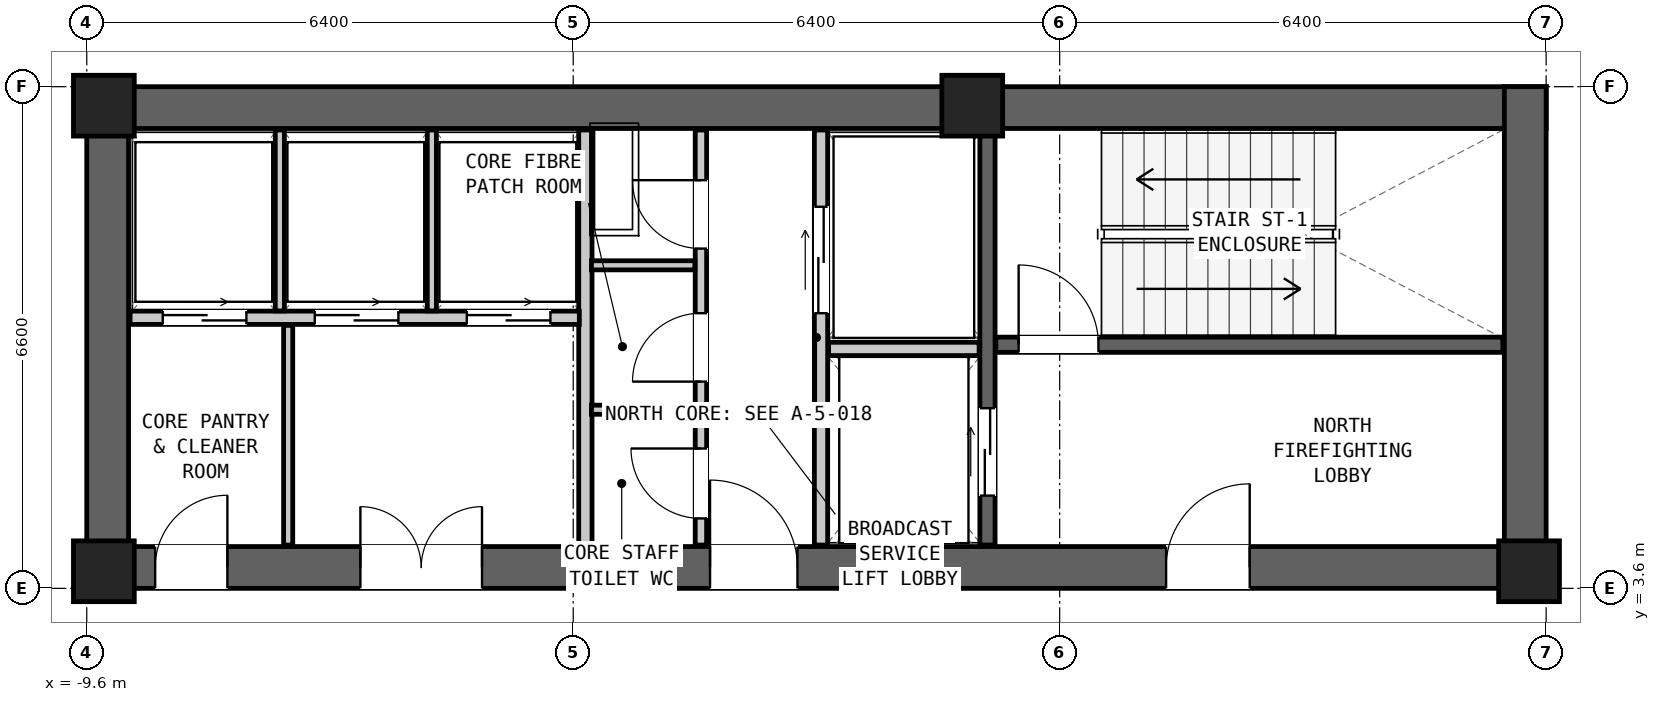
"""IFC4 building model, lengths in metres.
Left out: names, types, materials, properties, quantities, classifications, styles, units other than length and angle.
Written with IfcOpenShell. Run it as: python <this file> out.ifc"""

import sys

from ifc_helpers import new_model, si_unit, direction, frame, frame_2d, origin, origin_2d, place, context, subcontext, project, spatial, rectangle, extrude, element, fill, save


model = new_model("IFC4")
c1 = context("Model", 3, precision=1e-05, world=origin(), true_north=direction((0.0, 1.0)))
c2 = subcontext(c1, "Body", "Model", "MODEL_VIEW")
j1 = project(units=[si_unit("LENGTHUNIT", "METRE"), si_unit("PLANEANGLEUNIT", "RADIAN")], contexts=[c1])
p1 = place(None, origin())
s1 = spatial("IfcSite", under=j1, at=p1, CompositionType="ELEMENT")
p2 = place(p1, origin())
s2 = spatial("IfcBuilding", under=s1, at=p2, CompositionType="ELEMENT")
p3 = place(p2, frame((0.0, 0.0, 53.55)))
s3 = spatial("IfcBuildingStorey", under=s2, at=p3, CompositionType="ELEMENT", Elevation=53.55)
p4 = place(p3, frame((-9.6, 9.925, 0.0), z_axis=(0.0, 0.0, 1.0), x_axis=(1.0, 0.0, 0.0)))
e1 = element("IfcWall", 1, at=p4, inside=s3, PredefinedType="SHEAR", context=c2, shape_type="SweptSolid", body=[
    extrude(rectangle(XDim=19.2, YDim=0.55, at=frame_2d((9.6, 0.0))), origin(), (0.0, 0.0, 1.0), 4.35),
])
p5 = place(p3, frame((-9.6, 3.875, 0.0), z_axis=(0.0, 0.0, 1.0), x_axis=(1.0, 0.0, 0.0)))
e2 = element("IfcWall", 2, at=p5, inside=s3, PredefinedType="SHEAR", context=c2, shape_type="SweptSolid", body=[
    extrude(rectangle(XDim=19.2, YDim=0.55, at=frame_2d((9.6, 0.0))), origin(), (0.0, 0.0, 1.0), 4.35),
])
p6 = place(p5, frame((14.2, 0.0, 0.0)))
e3 = element("IfcOpeningElement", 3, at=p6, cuts=e2, PredefinedType="OPENING", context=c2, shape_type="SweptSolid", body=[
    extrude(rectangle(XDim=1.1, YDim=2.08, at=frame_2d((0.55, 1.04))), frame((0.0, 0.287, 0.0), z_axis=(0.0, -1.0, 0.0), x_axis=(1.0, 0.0, 0.0)), (0.0, 0.0, 1.0), 0.574),
])
p7 = place(p5, frame((8.2, 0.0, 0.0)))
e4 = element("IfcOpeningElement", 4, at=p7, cuts=e2, PredefinedType="OPENING", context=c2, shape_type="SweptSolid", body=[
    extrude(rectangle(XDim=1.15, YDim=2.1, at=frame_2d((0.575, 1.05))), frame((0.0, 0.287, 0.0), z_axis=(0.0, -1.0, 0.0), x_axis=(1.0, 0.0, 0.0)), (0.0, 0.0, 1.0), 0.574),
])
p8 = place(p5, frame((0.9, 0.0, 0.0)))
e5 = element("IfcOpeningElement", 5, at=p8, cuts=e2, PredefinedType="OPENING", context=c2, shape_type="SweptSolid", body=[
    extrude(rectangle(XDim=0.95, YDim=2.1, at=frame_2d((0.475, 1.05))), frame((0.0, 0.287, 0.0), z_axis=(0.0, -1.0, 0.0), x_axis=(1.0, 0.0, 0.0)), (0.0, 0.0, 1.0), 0.574),
])
p9 = place(p5, frame((3.6, 0.0, 0.0)))
e6 = element("IfcOpeningElement", 6, at=p9, cuts=e2, PredefinedType="OPENING", context=c2, shape_type="SweptSolid", body=[
    extrude(rectangle(XDim=1.6, YDim=2.12, at=frame_2d((0.8, 1.06))), frame((0.0, 0.287, 0.0), z_axis=(0.0, -1.0, 0.0), x_axis=(1.0, 0.0, 0.0)), (0.0, 0.0, 1.0), 0.574),
])
for number, where, z_axis, x_axis in (
    (7, (-9.325, 3.6, 0.0), (0.0, 0.0, 1.0), (0.0, 1.0, 0.0)),
    (8, (9.325, 3.6, 0.0), (0.0, 0.0, 1.0), (0.0, 1.0, 0.0)),
):
    element("IfcWall", number, at=place(p3, frame(where, z_axis=z_axis, x_axis=x_axis)), inside=s3, PredefinedType="SHEAR", context=c2, shape_type="SweptSolid", body=[
        extrude(rectangle(XDim=6.6, YDim=0.55, at=frame_2d((3.3, 0.0))), origin(), (0.0, 0.0, 1.0), 4.35),
    ])
for number, where, z_axis, x_axis in (
    (9, (-9.375, 9.95, 0.0), (0.0, 0.0, 1.0), (1.0, 0.0, 0.0)),
    (10, (2.05, 9.95, 0.0), (0.0, 0.0, 1.0), (1.0, 0.0, 0.0)),
    (11, (-9.375, 3.825, 0.0), (0.0, 0.0, 1.0), (1.0, 0.0, 0.0)),
    (12, (9.375, 3.825, 0.0), (0.0, 0.0, 1.0), (1.0, 0.0, 0.0)),
):
    element("IfcColumn", number, at=place(p3, frame(where, z_axis=z_axis, x_axis=x_axis)), inside=s3, PredefinedType="COLUMN", context=c2, shape_type="SweptSolid", body=[
        extrude(rectangle(XDim=0.8, YDim=0.8, at=origin_2d()), origin(), (0.0, 0.0, 1.0), 4.35),
    ])
p10 = place(p3, frame((2.36, 6.805, 0.0), z_axis=(0.0, 0.0, 1.0), x_axis=(1.0, 0.0, 0.0)))
e13 = element("IfcWall", 13, at=p10, inside=s3, PredefinedType="SHEAR", context=c2, shape_type="SweptSolid", body=[
    extrude(rectangle(XDim=6.67, YDim=0.2, at=frame_2d((3.335, 0.0))), origin(), (0.0, 0.0, 1.0), 4.07),
])
p11 = place(p10, frame((0.3, 0.0, 0.0)))
e14 = element("IfcOpeningElement", 14, at=p11, cuts=e13, PredefinedType="OPENING", context=c2, shape_type="SweptSolid", body=[
    extrude(rectangle(XDim=1.05, YDim=2.08, at=frame_2d((0.525, 1.04))), frame((0.0, 0.112, 0.0), z_axis=(0.0, -1.0, 0.0), x_axis=(1.0, 0.0, 0.0)), (0.0, 0.0, 1.0), 0.224),
])
p12 = place(p3, frame((2.25, 4.17, 0.0), z_axis=(0.0, 0.0, 1.0), x_axis=(0.0, 1.0, 0.0)))
e15 = element("IfcWall", 15, at=p12, inside=s3, PredefinedType="SHEAR", context=c2, shape_type="SweptSolid", body=[
    extrude(rectangle(XDim=5.46, YDim=0.2, at=frame_2d((2.73, 0.0))), origin(), (0.0, 0.0, 1.0), 4.07),
])
p13 = place(p12, frame((0.65, 0.0, 0.0)))
e16 = element("IfcOpeningElement", 16, at=p13, cuts=e15, PredefinedType="OPENING", context=c2, shape_type="SweptSolid", body=[
    extrude(rectangle(XDim=1.15, YDim=2.08, at=frame_2d((0.575, 1.04))), frame((0.0, 0.112, 0.0), z_axis=(0.0, -1.0, 0.0), x_axis=(1.0, 0.0, 0.0)), (0.0, 0.0, 1.0), 0.224),
])
p14 = place(p3, frame((0.06, 4.17, 0.0), z_axis=(0.0, 0.0, 1.0), x_axis=(0.0, 1.0, 0.0)))
e17 = element("IfcWall", 17, at=p14, inside=s3, PredefinedType="PARTITIONING", context=c2, shape_type="SweptSolid", body=[
    extrude(rectangle(XDim=5.46, YDim=0.175, at=frame_2d((2.73, 0.0))), origin(), (0.0, 0.0, 1.0), 4.07),
])
p15 = place(p14, frame((3.05, 0.0, 0.0)))
e18 = element("IfcOpeningElement", 18, at=p15, cuts=e17, PredefinedType="OPENING", context=c2, shape_type="SweptSolid", body=[
    extrude(rectangle(XDim=1.4, YDim=2.12, at=frame_2d((0.7, 1.06))), frame((0.0, 0.1, 0.0), z_axis=(0.0, -1.0, 0.0), x_axis=(1.0, 0.0, 0.0)), (0.0, 0.0, 1.0), 0.199),
])
p16 = place(p3, frame((0.16, 6.75, 0.0), z_axis=(0.0, 0.0, 1.0), x_axis=(1.0, 0.0, 0.0)))
e19 = element("IfcWall", 19, at=p16, inside=s3, PredefinedType="PARTITIONING", context=c2, shape_type="SweptSolid", body=[
    extrude(rectangle(XDim=1.98, YDim=0.175, at=frame_2d((0.99, 0.0))), origin(), (0.0, 0.0, 1.0), 4.07),
])
p17 = place(p3, frame((-3.04, 4.17, 0.0), z_axis=(0.0, 0.0, 1.0), x_axis=(0.0, 1.0, 0.0)))
e20 = element("IfcWall", 20, at=p17, inside=s3, PredefinedType="PARTITIONING", context=c2, shape_type="SweptSolid", body=[
    extrude(rectangle(XDim=5.46, YDim=0.175, at=frame_2d((2.73, 0.0))), origin(), (0.0, 0.0, 1.0), 4.07),
])
p18 = place(p3, frame((-1.52, 4.17, 0.0), z_axis=(0.0, 0.0, 1.0), x_axis=(0.0, 1.0, 0.0)))
e21 = element("IfcWall", 21, at=p18, inside=s3, PredefinedType="PARTITIONING", context=c2, shape_type="SweptSolid", body=[
    extrude(rectangle(XDim=5.46, YDim=0.15, at=frame_2d((2.73, 0.0))), origin(), (0.0, 0.0, 1.0), 4.07),
])
p19 = place(p18, frame((3.9, 0.0, 0.0)))
e22 = element("IfcOpeningElement", 22, at=p19, cuts=e21, PredefinedType="OPENING", context=c2, shape_type="SweptSolid", body=[
    extrude(rectangle(XDim=0.9, YDim=2.05, at=frame_2d((0.45, 1.025))), frame((0.0, 0.087, 0.0), z_axis=(0.0, -1.0, 0.0), x_axis=(1.0, 0.0, 0.0)), (0.0, 0.0, 1.0), 0.174),
])
p20 = place(p18, frame((2.15, 0.0, 0.0)))
e23 = element("IfcOpeningElement", 23, at=p20, cuts=e21, PredefinedType="OPENING", context=c2, shape_type="SweptSolid", body=[
    extrude(rectangle(XDim=0.9, YDim=2.05, at=frame_2d((0.45, 1.025))), frame((0.0, 0.087, 0.0), z_axis=(0.0, -1.0, 0.0), x_axis=(1.0, 0.0, 0.0)), (0.0, 0.0, 1.0), 0.174),
])
p21 = place(p18, frame((0.35, 0.0, 0.0)))
e24 = element("IfcOpeningElement", 24, at=p21, cuts=e21, PredefinedType="OPENING", context=c2, shape_type="SweptSolid", body=[
    extrude(rectangle(XDim=0.92, YDim=2.1, at=frame_2d((0.46, 1.05))), frame((0.0, 0.087, 0.0), z_axis=(0.0, -1.0, 0.0), x_axis=(1.0, 0.0, 0.0)), (0.0, 0.0, 1.0), 0.174),
])
for number, where, z_axis, x_axis in (
    (25, (-2.96, 5.95, 0.0), (0.0, 0.0, 1.0), (1.0, 0.0, 0.0)),
    (26, (-2.96, 7.85, 0.0), (0.0, 0.0, 1.0), (1.0, 0.0, 0.0)),
):
    element("IfcWall", number, at=place(p3, frame(where, z_axis=z_axis, x_axis=x_axis)), inside=s3, PredefinedType="PARTITIONING", context=c2, shape_type="SweptSolid", body=[
        extrude(rectangle(XDim=1.36, YDim=0.12, at=frame_2d((0.68, 0.0))), origin(), (0.0, 0.0, 1.0), 4.07),
    ])
p22 = place(p3, frame((-9.03, 7.16, 0.0), z_axis=(0.0, 0.0, 1.0), x_axis=(1.0, 0.0, 0.0)))
e27 = element("IfcWall", 27, at=p22, inside=s3, PredefinedType="PARTITIONING", context=c2, shape_type="SweptSolid", body=[
    extrude(rectangle(XDim=5.91, YDim=0.175, at=frame_2d((2.955, 0.0))), origin(), (0.0, 0.0, 1.0), 4.07),
])
p23 = place(p22, frame((0.43, 0.0, 0.0)))
e28 = element("IfcOpeningElement", 28, at=p23, cuts=e27, PredefinedType="OPENING", context=c2, shape_type="SweptSolid", body=[
    extrude(rectangle(XDim=1.1, YDim=2.06, at=frame_2d((0.55, 1.03))), frame((0.0, 0.1, 0.0), z_axis=(0.0, -1.0, 0.0), x_axis=(1.0, 0.0, 0.0)), (0.0, 0.0, 1.0), 0.199),
])
p24 = place(p22, frame((2.43, 0.0, 0.0)))
e29 = element("IfcOpeningElement", 29, at=p24, cuts=e27, PredefinedType="OPENING", context=c2, shape_type="SweptSolid", body=[
    extrude(rectangle(XDim=1.1, YDim=2.06, at=frame_2d((0.55, 1.03))), frame((0.0, 0.1, 0.0), z_axis=(0.0, -1.0, 0.0), x_axis=(1.0, 0.0, 0.0)), (0.0, 0.0, 1.0), 0.199),
])
p25 = place(p22, frame((4.43, 0.0, 0.0)))
e30 = element("IfcOpeningElement", 30, at=p25, cuts=e27, PredefinedType="OPENING", context=c2, shape_type="SweptSolid", body=[
    extrude(rectangle(XDim=1.1, YDim=2.06, at=frame_2d((0.55, 1.03))), frame((0.0, 0.1, 0.0), z_axis=(0.0, -1.0, 0.0), x_axis=(1.0, 0.0, 0.0)), (0.0, 0.0, 1.0), 0.199),
])
for number, where, z_axis, x_axis in (
    (31, (-7.06, 7.25, 0.0), (0.0, 0.0, 1.0), (0.0, 1.0, 0.0)),
    (32, (-5.06, 7.25, 0.0), (0.0, 0.0, 1.0), (0.0, 1.0, 0.0)),
):
    element("IfcWall", number, at=place(p3, frame(where, z_axis=z_axis, x_axis=x_axis)), inside=s3, PredefinedType="PARTITIONING", context=c2, shape_type="SweptSolid", body=[
        extrude(rectangle(XDim=2.38, YDim=0.12, at=frame_2d((1.19, 0.0))), origin(), (0.0, 0.0, 1.0), 4.07),
    ])
p26 = place(p3, frame((-6.95, 4.17, 0.0), z_axis=(0.0, 0.0, 1.0), x_axis=(0.0, 1.0, 0.0)))
e33 = element("IfcWall", 33, at=p26, inside=s3, PredefinedType="PARTITIONING", context=c2, shape_type="SweptSolid", body=[
    extrude(rectangle(XDim=2.89, YDim=0.12, at=frame_2d((1.445, 0.0))), origin(), (0.0, 0.0, 1.0), 4.07),
])
p27 = place(p11, origin())
e34 = element("IfcDoor", 34, at=p27, inside=s3, OperationType="SINGLE_SWING_LEFT", PredefinedType="DOOR", context=c2, shape_type="SweptSolid", body=[
    extrude(rectangle(XDim=1.05, YDim=2.08, at=frame_2d((0.525, 1.04))), frame((0.0, 0.025, 0.0), z_axis=(0.0, -1.0, 0.0), x_axis=(1.0, 0.0, 0.0)), (0.0, 0.0, 1.0), 0.05),
])
fill(e14, e34)
p28 = place(p6, origin())
e35 = element("IfcDoor", 35, at=p28, inside=s3, OperationType="SINGLE_SWING_RIGHT", PredefinedType="DOOR", context=c2, shape_type="SweptSolid", body=[
    extrude(rectangle(XDim=1.1, YDim=2.08, at=frame_2d((0.55, 1.04))), frame((0.0, 0.025, 0.0), z_axis=(0.0, -1.0, 0.0), x_axis=(1.0, 0.0, 0.0)), (0.0, 0.0, 1.0), 0.05),
])
fill(e3, e35)
p29 = place(p13, origin())
e36 = element("IfcDoor", 36, at=p29, inside=s3, OperationType="DOUBLE_DOOR_SLIDING", PredefinedType="DOOR", context=c2, shape_type="SweptSolid", body=[
    extrude(rectangle(XDim=1.15, YDim=2.08, at=frame_2d((0.575, 1.04))), frame((0.0, 0.025, 0.0), z_axis=(0.0, -1.0, 0.0), x_axis=(1.0, 0.0, 0.0)), (0.0, 0.0, 1.0), 0.05),
])
fill(e16, e36)
p30 = place(p15, origin())
e37 = element("IfcDoor", 37, at=p30, inside=s3, OperationType="DOUBLE_DOOR_SLIDING", PredefinedType="DOOR", context=c2, shape_type="SweptSolid", body=[
    extrude(rectangle(XDim=1.4, YDim=2.12, at=frame_2d((0.7, 1.06))), frame((0.0, 0.025, 0.0), z_axis=(0.0, -1.0, 0.0), x_axis=(1.0, 0.0, 0.0)), (0.0, 0.0, 1.0), 0.05),
])
fill(e18, e37)
p31 = place(p7, origin())
e38 = element("IfcDoor", 38, at=p31, inside=s3, OperationType="SINGLE_SWING_LEFT", PredefinedType="DOOR", context=c2, shape_type="SweptSolid", body=[
    extrude(rectangle(XDim=1.15, YDim=2.1, at=frame_2d((0.575, 1.05))), frame((0.0, 0.025, 0.0), z_axis=(0.0, -1.0, 0.0), x_axis=(1.0, 0.0, 0.0)), (0.0, 0.0, 1.0), 0.05),
])
fill(e4, e38)
p32 = place(p19, origin())
e39 = element("IfcDoor", 39, at=p32, inside=s3, OperationType="SINGLE_SWING_RIGHT", PredefinedType="DOOR", context=c2, shape_type="SweptSolid", body=[
    extrude(rectangle(XDim=0.9, YDim=2.05, at=frame_2d((0.45, 1.025))), frame((0.0, 0.025, 0.0), z_axis=(0.0, -1.0, 0.0), x_axis=(1.0, 0.0, 0.0)), (0.0, 0.0, 1.0), 0.05),
])
fill(e22, e39)
p33 = place(p20, origin())
e40 = element("IfcDoor", 40, at=p33, inside=s3, OperationType="SINGLE_SWING_LEFT", PredefinedType="DOOR", context=c2, shape_type="SweptSolid", body=[
    extrude(rectangle(XDim=0.9, YDim=2.05, at=frame_2d((0.45, 1.025))), frame((0.0, 0.025, 0.0), z_axis=(0.0, -1.0, 0.0), x_axis=(1.0, 0.0, 0.0)), (0.0, 0.0, 1.0), 0.05),
])
fill(e23, e40)
p34 = place(p21, origin())
e41 = element("IfcDoor", 41, at=p34, inside=s3, OperationType="SINGLE_SWING_RIGHT", PredefinedType="DOOR", context=c2, shape_type="SweptSolid", body=[
    extrude(rectangle(XDim=0.92, YDim=2.1, at=frame_2d((0.46, 1.05))), frame((0.0, 0.025, 0.0), z_axis=(0.0, -1.0, 0.0), x_axis=(1.0, 0.0, 0.0)), (0.0, 0.0, 1.0), 0.05),
])
fill(e24, e41)
p35 = place(p23, origin())
e42 = element("IfcDoor", 42, at=p35, inside=s3, OperationType="DOUBLE_DOOR_SLIDING", PredefinedType="DOOR", context=c2, shape_type="SweptSolid", body=[
    extrude(rectangle(XDim=1.1, YDim=2.06, at=frame_2d((0.55, 1.03))), frame((0.0, 0.025, 0.0), z_axis=(0.0, -1.0, 0.0), x_axis=(1.0, 0.0, 0.0)), (0.0, 0.0, 1.0), 0.05),
])
fill(e28, e42)
p36 = place(p24, origin())
e43 = element("IfcDoor", 43, at=p36, inside=s3, OperationType="DOUBLE_DOOR_SLIDING", PredefinedType="DOOR", context=c2, shape_type="SweptSolid", body=[
    extrude(rectangle(XDim=1.1, YDim=2.06, at=frame_2d((0.55, 1.03))), frame((0.0, 0.025, 0.0), z_axis=(0.0, -1.0, 0.0), x_axis=(1.0, 0.0, 0.0)), (0.0, 0.0, 1.0), 0.05),
])
fill(e29, e43)
p37 = place(p25, origin())
e44 = element("IfcDoor", 44, at=p37, inside=s3, OperationType="DOUBLE_DOOR_SLIDING", PredefinedType="DOOR", context=c2, shape_type="SweptSolid", body=[
    extrude(rectangle(XDim=1.1, YDim=2.06, at=frame_2d((0.55, 1.03))), frame((0.0, 0.025, 0.0), z_axis=(0.0, -1.0, 0.0), x_axis=(1.0, 0.0, 0.0)), (0.0, 0.0, 1.0), 0.05),
])
fill(e30, e44)
p38 = place(p8, origin())
e45 = element("IfcDoor", 45, at=p38, inside=s3, OperationType="SINGLE_SWING_RIGHT", PredefinedType="DOOR", context=c2, shape_type="SweptSolid", body=[
    extrude(rectangle(XDim=0.95, YDim=2.1, at=frame_2d((0.475, 1.05))), frame((0.0, 0.025, 0.0), z_axis=(0.0, -1.0, 0.0), x_axis=(1.0, 0.0, 0.0)), (0.0, 0.0, 1.0), 0.05),
])
fill(e5, e45)
p39 = place(p9, origin())
e46 = element("IfcDoor", 46, at=p39, inside=s3, OperationType="DOUBLE_DOOR_SINGLE_SWING", PredefinedType="DOOR", context=c2, shape_type="SweptSolid", body=[
    extrude(rectangle(XDim=1.6, YDim=2.12, at=frame_2d((0.8, 1.06))), frame((0.0, 0.025, 0.0), z_axis=(0.0, -1.0, 0.0), x_axis=(1.0, 0.0, 0.0)), (0.0, 0.0, 1.0), 0.05),
])
fill(e6, e46)
save(model, sys.argv[1])
